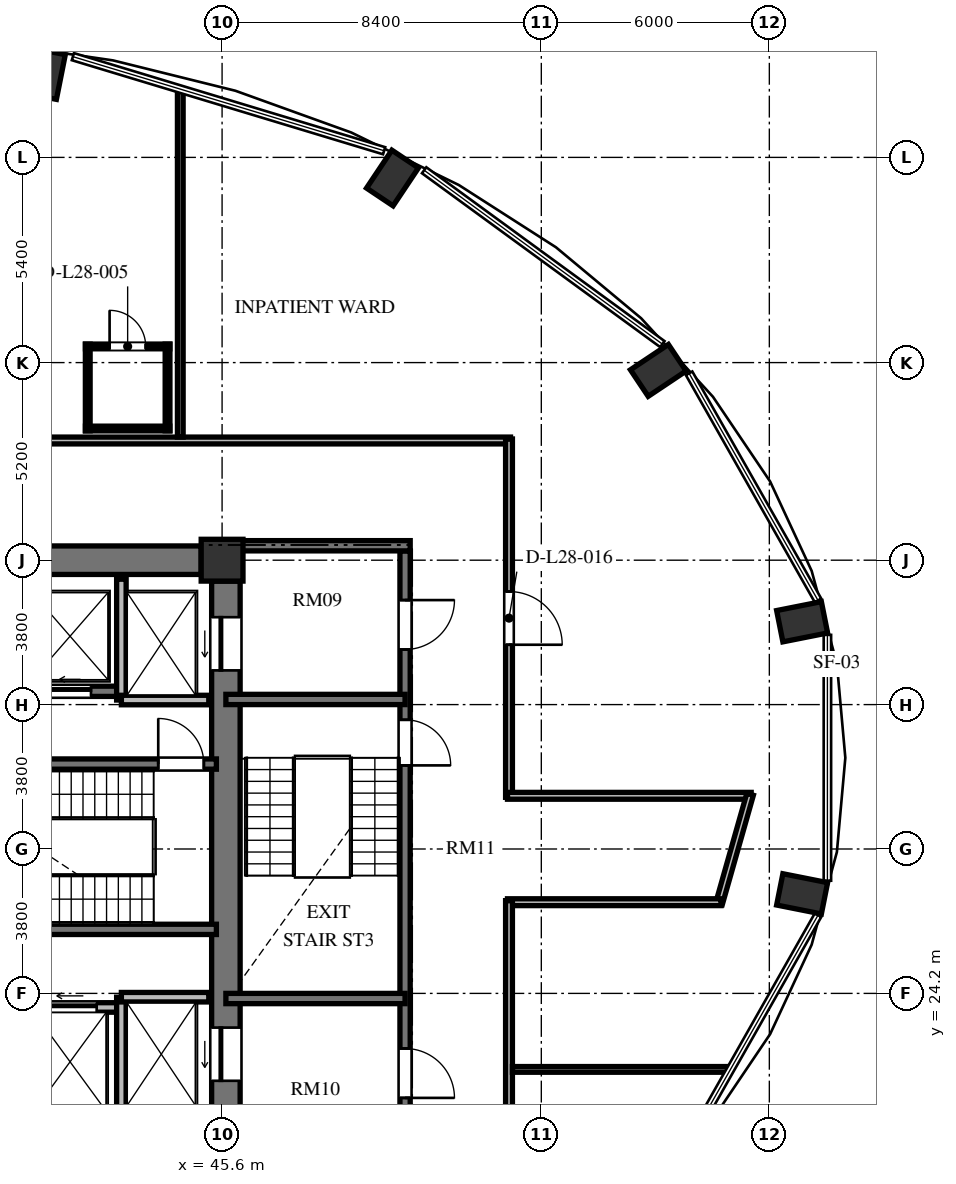
"""IFC4 building model, lengths in metres.
Left out: names, types, materials, properties, quantities, classifications, styles, units other than length and angle.
Written with IfcOpenShell. Run it as: python <this file> out.ifc"""

import sys

from ifc_helpers import new_model, si_unit, direction, frame, frame_2d, origin, origin_2d, place, context, subcontext, project, spatial, rectangle, extrude, element, fill, save


model = new_model("IFC4")
c1 = context("Model", 3, precision=1e-05, world=origin(), true_north=direction((0.0, 1.0)))
c2 = subcontext(c1, "Body", "Model", "MODEL_VIEW")
j1 = project(units=[si_unit("LENGTHUNIT", "METRE"), si_unit("PLANEANGLEUNIT", "RADIAN")], contexts=[c1])
p1 = place(None, origin())
s1 = spatial("IfcSite", under=j1, at=p1, CompositionType="ELEMENT")
p2 = place(p1, origin())
s2 = spatial("IfcBuilding", under=s1, at=p2, CompositionType="ELEMENT")
p3 = place(p2, frame((0.0, 0.0, 110.928)))
s3 = spatial("IfcBuildingStorey", under=s2, at=p3, CompositionType="ELEMENT", Elevation=110.928)
for number, where, z_axis, x_axis in (
    (1, (60.863, 26.82, 0.0), (0.0, 0.0, 1.0), (0.981, -0.195, 0.0)),
    (2, (60.863, 33.98, 0.0), (0.0, 0.0, 1.0), (0.981, 0.195, 0.0)),
    (3, (57.078, 40.595, 0.0), (0.0, 0.0, 1.0), (0.831, 0.556, 0.0)),
    (4, (50.084, 45.657, 0.0), (0.0, 0.0, 1.0), (0.556, 0.831, 0.0)),
    (5, (40.946, 48.397, 0.0), (0.0, 0.0, 1.0), (0.195, 0.981, 0.0)),
):
    element("IfcColumn", number, at=place(p3, frame(where, z_axis=z_axis, x_axis=x_axis)), inside=s3, PredefinedType="COLUMN", context=c2, shape_type="SweptSolid", body=[
        extrude(rectangle(XDim=1.2, YDim=0.84, at=origin_2d()), origin(), (0.0, 0.0, 1.0), 3.648),
    ])
p4 = place(p3, frame((45.6, 35.6, 0.0), z_axis=(0.0, 0.0, 1.0), x_axis=(1.0, 0.0, 0.0)))
e6 = element("IfcColumn", 6, at=p4, inside=s3, PredefinedType="COLUMN", context=c2, shape_type="SweptSolid", body=[
    extrude(rectangle(XDim=1.1, YDim=1.1, at=origin_2d()), origin(), (0.0, 0.0, 1.0), 3.648),
])
p5 = place(p3, frame((45.7, 20.95, 0.0), z_axis=(0.0, 0.0, 1.0), x_axis=(0.0, 1.0, 0.0)))
e7 = element("IfcWall", 7, at=p5, inside=s3, PredefinedType="SHEAR", context=c2, shape_type="SweptSolid", body=[
    extrude(rectangle(XDim=14.1, YDim=0.75, at=frame_2d((7.05, 0.0))), origin(), (0.0, 0.0, 1.0), 3.648),
])
p6 = place(p5, frame((11.75, 0.0, 0.0)))
e8 = element("IfcOpeningElement", 8, at=p6, cuts=e7, PredefinedType="OPENING", context=c2, shape_type="SweptSolid", body=[
    extrude(rectangle(XDim=1.4, YDim=2.3, at=frame_2d((0.7, 1.15))), frame((0.0, 0.385, 0.0), z_axis=(0.0, -1.0, 0.0), x_axis=(1.0, 0.0, 0.0)), (0.0, 0.0, 1.0), 0.77),
])
p7 = place(p5, frame((0.95, 0.0, 0.0)))
e9 = element("IfcOpeningElement", 9, at=p7, cuts=e7, PredefinedType="OPENING", context=c2, shape_type="SweptSolid", body=[
    extrude(rectangle(XDim=1.4, YDim=2.3, at=frame_2d((0.7, 1.15))), frame((0.0, 0.385, 0.0), z_axis=(0.0, -1.0, 0.0), x_axis=(1.0, 0.0, 0.0)), (0.0, 0.0, 1.0), 0.77),
])
p8 = place(p3, frame((39.675, 35.6, 0.0), z_axis=(0.0, 0.0, 1.0), x_axis=(1.0, 0.0, 0.0)))
e10 = element("IfcWall", 10, at=p8, inside=s3, PredefinedType="SHEAR", context=c2, shape_type="SweptSolid", body=[
    extrude(rectangle(XDim=5.375, YDim=0.75, at=frame_2d((2.688, 0.0))), origin(), (0.0, 0.0, 1.0), 3.648),
])
p9 = place(p3, frame((37.465, 30.235, 0.0), z_axis=(0.0, 0.0, 1.0), x_axis=(1.0, 0.0, 0.0)))
e11 = element("IfcWall", 11, at=p9, inside=s3, PredefinedType="SHEAR", context=c2, shape_type="SweptSolid", body=[
    extrude(rectangle(XDim=7.985, YDim=0.27, at=frame_2d((3.992, 0.0))), origin(), (0.0, 0.0, 1.0), 3.648),
])
p10 = place(p9, frame((6.455, 0.0, 0.0)))
e12 = element("IfcOpeningElement", 12, at=p10, cuts=e11, PredefinedType="OPENING", context=c2, shape_type="SweptSolid", body=[
    extrude(rectangle(XDim=1.2, YDim=2.15, at=frame_2d((0.6, 1.075))), frame((0.0, 0.145, 0.0), z_axis=(0.0, -1.0, 0.0), x_axis=(1.0, 0.0, 0.0)), (0.0, 0.0, 1.0), 0.29),
])
p11 = place(p3, frame((37.465, 25.885, 0.0), z_axis=(0.0, 0.0, 1.0), x_axis=(1.0, 0.0, 0.0)))
e13 = element("IfcWall", 13, at=p11, inside=s3, PredefinedType="SHEAR", context=c2, shape_type="SweptSolid", body=[
    extrude(rectangle(XDim=7.985, YDim=0.27, at=frame_2d((3.992, 0.0))), origin(), (0.0, 0.0, 1.0), 3.648),
])
p12 = place(p3, frame((26.55, 32.15, 0.0), z_axis=(0.0, 0.0, 1.0), x_axis=(1.0, 0.0, 0.0)))
e14 = element("IfcWall", 14, at=p12, inside=s3, PredefinedType="SHEAR", context=c2, shape_type="SweptSolid", body=[
    extrude(rectangle(XDim=16.4, YDim=0.27, at=frame_2d((8.2, 0.0))), origin(), (0.0, 0.0, 1.0), 3.648),
])
p13 = place(p12, frame((1.1, 0.0, 0.0)))
e15 = element("IfcOpeningElement", 15, at=p13, cuts=e14, PredefinedType="OPENING", context=c2, shape_type="SweptSolid", body=[
    extrude(rectangle(XDim=1.1, YDim=2.2, at=frame_2d((0.55, 1.1))), frame((0.0, 0.145, 0.0), z_axis=(0.0, -1.0, 0.0), x_axis=(1.0, 0.0, 0.0)), (0.0, 0.0, 1.0), 0.29),
])
p14 = place(p12, frame((3.7, 0.0, 0.0)))
e16 = element("IfcOpeningElement", 16, at=p14, cuts=e14, PredefinedType="OPENING", context=c2, shape_type="SweptSolid", body=[
    extrude(rectangle(XDim=1.1, YDim=2.2, at=frame_2d((0.55, 1.1))), frame((0.0, 0.145, 0.0), z_axis=(0.0, -1.0, 0.0), x_axis=(1.0, 0.0, 0.0)), (0.0, 0.0, 1.0), 0.29),
])
p15 = place(p12, frame((6.5, 0.0, 0.0)))
e17 = element("IfcOpeningElement", 17, at=p15, cuts=e14, PredefinedType="OPENING", context=c2, shape_type="SweptSolid", body=[
    extrude(rectangle(XDim=1.1, YDim=2.2, at=frame_2d((0.55, 1.1))), frame((0.0, 0.145, 0.0), z_axis=(0.0, -1.0, 0.0), x_axis=(1.0, 0.0, 0.0)), (0.0, 0.0, 1.0), 0.29),
])
p16 = place(p12, frame((9.1, 0.0, 0.0)))
e18 = element("IfcOpeningElement", 18, at=p16, cuts=e14, PredefinedType="OPENING", context=c2, shape_type="SweptSolid", body=[
    extrude(rectangle(XDim=1.1, YDim=2.2, at=frame_2d((0.55, 1.1))), frame((0.0, 0.145, 0.0), z_axis=(0.0, -1.0, 0.0), x_axis=(1.0, 0.0, 0.0)), (0.0, 0.0, 1.0), 0.29),
])
p17 = place(p12, frame((11.9, 0.0, 0.0)))
e19 = element("IfcOpeningElement", 19, at=p17, cuts=e14, PredefinedType="OPENING", context=c2, shape_type="SweptSolid", body=[
    extrude(rectangle(XDim=1.1, YDim=2.2, at=frame_2d((0.55, 1.1))), frame((0.0, 0.145, 0.0), z_axis=(0.0, -1.0, 0.0), x_axis=(1.0, 0.0, 0.0)), (0.0, 0.0, 1.0), 0.29),
])
p18 = place(p12, frame((14.5, 0.0, 0.0)))
e20 = element("IfcOpeningElement", 20, at=p18, cuts=e14, PredefinedType="OPENING", context=c2, shape_type="SweptSolid", body=[
    extrude(rectangle(XDim=1.1, YDim=2.2, at=frame_2d((0.55, 1.1))), frame((0.0, 0.145, 0.0), z_axis=(0.0, -1.0, 0.0), x_axis=(1.0, 0.0, 0.0)), (0.0, 0.0, 1.0), 0.29),
])
p19 = place(p3, frame((26.75, 23.83, 0.0), z_axis=(0.0, 0.0, 1.0), x_axis=(1.0, 0.0, 0.0)))
e21 = element("IfcWall", 21, at=p19, inside=s3, PredefinedType="SOLIDWALL", context=c2, shape_type="SweptSolid", body=[
    extrude(rectangle(XDim=16.2, YDim=0.25, at=frame_2d((8.1, 0.0))), origin(), (0.0, 0.0, 1.0), 3.428),
])
p20 = place(p19, frame((0.9, 0.0, 0.0)))
e22 = element("IfcOpeningElement", 22, at=p20, cuts=e21, PredefinedType="OPENING", context=c2, shape_type="SweptSolid", body=[
    extrude(rectangle(XDim=1.1, YDim=2.2, at=frame_2d((0.55, 1.1))), frame((0.0, 0.135, 0.0), z_axis=(0.0, -1.0, 0.0), x_axis=(1.0, 0.0, 0.0)), (0.0, 0.0, 1.0), 0.27),
])
p21 = place(p19, frame((3.5, 0.0, 0.0)))
e23 = element("IfcOpeningElement", 23, at=p21, cuts=e21, PredefinedType="OPENING", context=c2, shape_type="SweptSolid", body=[
    extrude(rectangle(XDim=1.1, YDim=2.2, at=frame_2d((0.55, 1.1))), frame((0.0, 0.135, 0.0), z_axis=(0.0, -1.0, 0.0), x_axis=(1.0, 0.0, 0.0)), (0.0, 0.0, 1.0), 0.27),
])
p22 = place(p19, frame((6.3, 0.0, 0.0)))
e24 = element("IfcOpeningElement", 24, at=p22, cuts=e21, PredefinedType="OPENING", context=c2, shape_type="SweptSolid", body=[
    extrude(rectangle(XDim=1.1, YDim=2.2, at=frame_2d((0.55, 1.1))), frame((0.0, 0.135, 0.0), z_axis=(0.0, -1.0, 0.0), x_axis=(1.0, 0.0, 0.0)), (0.0, 0.0, 1.0), 0.27),
])
p23 = place(p19, frame((8.9, 0.0, 0.0)))
e25 = element("IfcOpeningElement", 25, at=p23, cuts=e21, PredefinedType="OPENING", context=c2, shape_type="SweptSolid", body=[
    extrude(rectangle(XDim=1.1, YDim=2.2, at=frame_2d((0.55, 1.1))), frame((0.0, 0.135, 0.0), z_axis=(0.0, -1.0, 0.0), x_axis=(1.0, 0.0, 0.0)), (0.0, 0.0, 1.0), 0.27),
])
p24 = place(p19, frame((11.7, 0.0, 0.0)))
e26 = element("IfcOpeningElement", 26, at=p24, cuts=e21, PredefinedType="OPENING", context=c2, shape_type="SweptSolid", body=[
    extrude(rectangle(XDim=1.1, YDim=2.2, at=frame_2d((0.55, 1.1))), frame((0.0, 0.135, 0.0), z_axis=(0.0, -1.0, 0.0), x_axis=(1.0, 0.0, 0.0)), (0.0, 0.0, 1.0), 0.27),
])
p25 = place(p19, frame((14.15, 0.0, 0.0)))
e27 = element("IfcOpeningElement", 27, at=p25, cuts=e21, PredefinedType="OPENING", context=c2, shape_type="SweptSolid", body=[
    extrude(rectangle(XDim=1.4, YDim=2.3, at=frame_2d((0.7, 1.15))), frame((0.0, 0.135, 0.0), z_axis=(0.0, -1.0, 0.0), x_axis=(1.0, 0.0, 0.0)), (0.0, 0.0, 1.0), 0.27),
])
p26 = place(p3, frame((42.95, 31.92, 0.0), z_axis=(0.0, 0.0, 1.0), x_axis=(0.0, 1.0, 0.0)))
e28 = element("IfcWall", 28, at=p26, inside=s3, PredefinedType="SOLIDWALL", context=c2, shape_type="SweptSolid", body=[
    extrude(rectangle(XDim=3.18, YDim=0.25, at=frame_2d((1.59, 0.0))), origin(), (0.0, 0.0, 1.0), 3.428),
])
p27 = place(p3, frame((42.95, 31.92, 0.0), z_axis=(0.0, 0.0, 1.0), x_axis=(1.0, 0.0, 0.0)))
e29 = element("IfcWall", 29, at=p27, inside=s3, PredefinedType="SOLIDWALL", context=c2, shape_type="SweptSolid", body=[
    extrude(rectangle(XDim=2.3, YDim=0.25, at=frame_2d((1.15, 0.0))), origin(), (0.0, 0.0, 1.0), 3.428),
])
p28 = place(p3, frame((42.95, 20.9, 0.0), z_axis=(0.0, 0.0, 1.0), x_axis=(0.0, 1.0, 0.0)))
e30 = element("IfcWall", 30, at=p28, inside=s3, PredefinedType="SOLIDWALL", context=c2, shape_type="SweptSolid", body=[
    extrude(rectangle(XDim=3.2, YDim=0.25, at=frame_2d((1.6, 0.0))), origin(), (0.0, 0.0, 1.0), 3.428),
])
p29 = place(p3, frame((42.95, 24.1, 0.0), z_axis=(0.0, 0.0, 1.0), x_axis=(1.0, 0.0, 0.0)))
e31 = element("IfcWall", 31, at=p29, inside=s3, PredefinedType="SOLIDWALL", context=c2, shape_type="SweptSolid", body=[
    extrude(rectangle(XDim=2.3, YDim=0.25, at=frame_2d((1.15, 0.0))), origin(), (0.0, 0.0, 1.0), 3.428),
])
p30 = place(p3, frame((50.415, 35.845, 0.0), z_axis=(0.0, 0.0, 1.0), x_axis=(0.0, -1.0, 0.0)))
e32 = element("IfcWall", 32, at=p30, inside=s3, PredefinedType="SHEAR", context=c2, shape_type="SweptSolid", body=[
    extrude(rectangle(XDim=15.825, YDim=0.27, at=frame_2d((7.913, 0.0))), origin(), (0.0, 0.0, 1.0), 3.648),
])
p31 = place(p30, frame((4.445, 0.0, 0.0)))
e33 = element("IfcOpeningElement", 33, at=p31, cuts=e32, PredefinedType="OPENING", context=c2, shape_type="SweptSolid", body=[
    extrude(rectangle(XDim=1.2, YDim=2.15, at=frame_2d((0.6, 1.075))), frame((0.0, 0.145, 0.0), z_axis=(0.0, -1.0, 0.0), x_axis=(1.0, 0.0, 0.0)), (0.0, 0.0, 1.0), 0.29),
])
p32 = place(p30, frame((1.295, 0.0, 0.0)))
e34 = element("IfcOpeningElement", 34, at=p32, cuts=e32, PredefinedType="OPENING", context=c2, shape_type="SweptSolid", body=[
    extrude(rectangle(XDim=1.3, YDim=2.2, at=frame_2d((0.65, 1.1))), frame((0.0, 0.145, 0.0), z_axis=(0.0, -1.0, 0.0), x_axis=(1.0, 0.0, 0.0)), (0.0, 0.0, 1.0), 0.29),
])
p33 = place(p30, frame((13.095, 0.0, 0.0)))
e35 = element("IfcOpeningElement", 35, at=p33, cuts=e32, PredefinedType="OPENING", context=c2, shape_type="SweptSolid", body=[
    extrude(rectangle(XDim=1.3, YDim=2.2, at=frame_2d((0.65, 1.1))), frame((0.0, 0.145, 0.0), z_axis=(0.0, -1.0, 0.0), x_axis=(1.0, 0.0, 0.0)), (0.0, 0.0, 1.0), 0.29),
])
p34 = place(p3, frame((46.075, 35.98, 0.0), z_axis=(0.0, 0.0, 1.0), x_axis=(1.0, 0.0, 0.0)))
e36 = element("IfcWall", 36, at=p34, inside=s3, PredefinedType="SHEAR", context=c2, shape_type="SweptSolid", body=[
    extrude(rectangle(XDim=4.475, YDim=0.27, at=frame_2d((2.238, 0.0))), origin(), (0.0, 0.0, 1.0), 3.648),
])
for number, where, z_axis, x_axis in (
    (37, (45.7, 31.935, 0.0), (0.0, 0.0, 1.0), (1.0, 0.0, 0.0)),
    (38, (45.7, 24.065, 0.0), (0.0, 0.0, 1.0), (1.0, 0.0, 0.0)),
):
    element("IfcWall", number, at=place(p3, frame(where, z_axis=z_axis, x_axis=x_axis)), inside=s3, PredefinedType="SHEAR", context=c2, shape_type="SweptSolid", body=[
        extrude(rectangle(XDim=4.715, YDim=0.27, at=frame_2d((2.357, 0.0))), origin(), (0.0, 0.0, 1.0), 3.648),
    ])
p35 = place(p3, frame((23.287, 38.75, 0.0), z_axis=(0.0, 0.0, 1.0), x_axis=(1.0, 0.0, 0.0)))
e39 = element("IfcWall", 39, at=p35, inside=s3, PredefinedType="PARTITIONING", context=c2, shape_type="SweptSolid", body=[
    extrude(rectangle(XDim=29.903, YDim=0.18, at=frame_2d((14.952, 0.0))), origin(), (0.0, 0.0, 1.0), 3.053),
])
p36 = place(p35, frame((12.615, 0.0, 0.0)))
e40 = element("IfcOpeningElement", 40, at=p36, cuts=e39, PredefinedType="OPENING", context=c2, shape_type="SweptSolid", body=[
    extrude(rectangle(XDim=1.4, YDim=2.2, at=frame_2d((0.7, 1.1))), frame((0.0, 0.1, 0.0), z_axis=(0.0, -1.0, 0.0), x_axis=(1.0, 0.0, 0.0)), (0.0, 0.0, 1.0), 0.2),
])
p37 = place(p35, frame((3.567, 0.0, 0.0)))
e41 = element("IfcOpeningElement", 41, at=p37, cuts=e39, PredefinedType="OPENING", context=c2, shape_type="SweptSolid", body=[
    extrude(rectangle(XDim=1.4, YDim=2.2, at=frame_2d((0.7, 1.1))), frame((0.0, 0.1, 0.0), z_axis=(0.0, -1.0, 0.0), x_axis=(1.0, 0.0, 0.0)), (0.0, 0.0, 1.0), 0.2),
])
p38 = place(p3, frame((53.15, 38.79, 0.0), z_axis=(0.0, 0.0, 1.0), x_axis=(0.0, -1.0, 0.0)))
e42 = element("IfcWall", 42, at=p38, inside=s3, PredefinedType="PARTITIONING", context=c2, shape_type="SweptSolid", body=[
    extrude(rectangle(XDim=9.43, YDim=0.18, at=frame_2d((4.715, 0.0))), origin(), (0.0, 0.0, 1.0), 3.428),
])
p39 = place(p38, frame((4.015, 0.0, 0.0)))
e43 = element("IfcOpeningElement", 43, at=p39, cuts=e42, PredefinedType="OPENING", context=c2, shape_type="SweptSolid", body=[
    extrude(rectangle(XDim=1.4, YDim=2.2, at=frame_2d((0.7, 1.1))), frame((0.0, 0.1, 0.0), z_axis=(0.0, -1.0, 0.0), x_axis=(1.0, 0.0, 0.0)), (0.0, 0.0, 1.0), 0.2),
])
p40 = place(p3, frame((53.11, 29.4, 0.0), z_axis=(0.0, 0.0, 1.0), x_axis=(1.0, 0.0, 0.0)))
e44 = element("IfcWall", 44, at=p40, inside=s3, PredefinedType="PARTITIONING", context=c2, shape_type="SweptSolid", body=[
    extrude(rectangle(XDim=6.413, YDim=0.18, at=frame_2d((3.206, 0.0))), origin(), (0.0, 0.0, 1.0), 3.428),
])
p41 = place(p3, frame((59.494, 29.438, 0.0), z_axis=(0.0, 0.0, 1.0), x_axis=(-0.273222154729, -0.961950962453, 0.0)))
e45 = element("IfcWall", 45, at=p41, inside=s3, PredefinedType="PARTITIONING", context=c2, shape_type="SweptSolid", body=[
    extrude(rectangle(XDim=2.991, YDim=0.18, at=frame_2d((1.495, 0.0))), origin(), (0.0, 0.0, 1.0), 3.428),
])
p42 = place(p3, frame((58.727, 26.6, 0.0), z_axis=(0.0, 0.0, 1.0), x_axis=(-1.0, 0.0, 0.0)))
e46 = element("IfcWall", 46, at=p42, inside=s3, PredefinedType="PARTITIONING", context=c2, shape_type="SweptSolid", body=[
    extrude(rectangle(XDim=5.617, YDim=0.18, at=frame_2d((2.809, 0.0))), origin(), (0.0, 0.0, 1.0), 3.428),
])
p43 = place(p3, frame((53.15, 26.64, 0.0), z_axis=(0.0, 0.0, 1.0), x_axis=(0.0, -1.0, 0.0)))
e47 = element("IfcWall", 47, at=p43, inside=s3, PredefinedType="PARTITIONING", context=c2, shape_type="SweptSolid", body=[
    extrude(rectangle(XDim=6.66, YDim=0.18, at=frame_2d((3.33, 0.0))), origin(), (0.0, 0.0, 1.0), 3.428),
])
p44 = place(p3, frame((53.24, 22.2, 0.0), z_axis=(0.0, 0.0, 1.0), x_axis=(1.0, 0.0, 0.0)))
e48 = element("IfcWall", 48, at=p44, inside=s3, PredefinedType="PARTITIONING", context=c2, shape_type="SweptSolid", body=[
    extrude(rectangle(XDim=5.731, YDim=0.15, at=frame_2d((2.866, 0.0))), origin(), (0.0, 0.0, 1.0), 3.428),
])
p45 = place(p3, frame((44.5, 38.84, 0.0), z_axis=(0.0, 0.0, 1.0), x_axis=(0.0, 1.0, 0.0)))
e49 = element("IfcWall", 49, at=p45, inside=s3, PredefinedType="PARTITIONING", context=c2, shape_type="SweptSolid", body=[
    extrude(rectangle(XDim=9.143, YDim=0.15, at=frame_2d((4.571, 0.0))), origin(), (0.0, 0.0, 1.0), 3.428),
])
p46 = place(p3, frame((42.005, 41.225, 0.0), z_axis=(0.0, 0.0, 1.0), x_axis=(1.0, 0.0, 0.0)))
e50 = element("IfcWall", 50, at=p46, inside=s3, PredefinedType="PARTITIONING", context=c2, shape_type="SweptSolid", body=[
    extrude(rectangle(XDim=2.22, YDim=0.125, at=frame_2d((1.11, 0.0))), origin(), (0.0, 0.0, 1.0), 3.428),
])
p47 = place(p46, frame((0.635, 0.0, 0.0)))
e51 = element("IfcOpeningElement", 51, at=p47, cuts=e50, PredefinedType="OPENING", context=c2, shape_type="SweptSolid", body=[
    extrude(rectangle(XDim=0.95, YDim=2.1, at=frame_2d((0.475, 1.05))), frame((0.0, 0.073, 0.0), z_axis=(0.0, -1.0, 0.0), x_axis=(1.0, 0.0, 0.0)), (0.0, 0.0, 1.0), 0.145),
])
p48 = place(p3, frame((42.005, 39.065, 0.0), z_axis=(0.0, 0.0, 1.0), x_axis=(1.0, 0.0, 0.0)))
e52 = element("IfcWall", 52, at=p48, inside=s3, PredefinedType="PARTITIONING", context=c2, shape_type="SweptSolid", body=[
    extrude(rectangle(XDim=2.22, YDim=0.125, at=frame_2d((1.11, 0.0))), origin(), (0.0, 0.0, 1.0), 3.428),
])
for number, where, z_axis, x_axis in (
    (53, (44.165, 39.005, 0.0), (0.0, 0.0, 1.0), (0.0, 1.0, 0.0)),
    (54, (42.065, 39.005, 0.0), (0.0, 0.0, 1.0), (0.0, 1.0, 0.0)),
):
    element("IfcWall", number, at=place(p3, frame(where, z_axis=z_axis, x_axis=x_axis)), inside=s3, PredefinedType="PARTITIONING", context=c2, shape_type="SweptSolid", body=[
        extrude(rectangle(XDim=2.28, YDim=0.125, at=frame_2d((1.14, 0.0))), origin(), (0.0, 0.0, 1.0), 3.428),
    ])
p49 = place(p10, origin())
e55 = element("IfcDoor", 55, at=p49, inside=s3, OperationType="SINGLE_SWING_LEFT", PredefinedType="DOOR", context=c2, shape_type="SweptSolid", body=[
    extrude(rectangle(XDim=1.2, YDim=2.15, at=frame_2d((0.6, 1.075))), frame((0.0, 0.025, 0.0), z_axis=(0.0, -1.0, 0.0), x_axis=(1.0, 0.0, 0.0)), (0.0, 0.0, 1.0), 0.05),
])
fill(e12, e55)
p50 = place(p18, origin())
e56 = element("IfcDoor", 56, at=p50, inside=s3, OperationType="SLIDING_TO_LEFT", PredefinedType="DOOR", context=c2, shape_type="SweptSolid", body=[
    extrude(rectangle(XDim=1.1, YDim=2.2, at=frame_2d((0.55, 1.1))), frame((0.0, 0.025, 0.0), z_axis=(0.0, -1.0, 0.0), x_axis=(1.0, 0.0, 0.0)), (0.0, 0.0, 1.0), 0.05),
])
fill(e20, e56)
p51 = place(p6, origin())
e57 = element("IfcDoor", 57, at=p51, inside=s3, OperationType="SLIDING_TO_LEFT", PredefinedType="DOOR", context=c2, shape_type="SweptSolid", body=[
    extrude(rectangle(XDim=1.4, YDim=2.3, at=frame_2d((0.7, 1.15))), frame((0.0, 0.025, 0.0), z_axis=(0.0, -1.0, 0.0), x_axis=(1.0, 0.0, 0.0)), (0.0, 0.0, 1.0), 0.05),
])
fill(e8, e57)
p52 = place(p7, origin())
e58 = element("IfcDoor", 58, at=p52, inside=s3, OperationType="SLIDING_TO_LEFT", PredefinedType="DOOR", context=c2, shape_type="SweptSolid", body=[
    extrude(rectangle(XDim=1.4, YDim=2.3, at=frame_2d((0.7, 1.15))), frame((0.0, 0.025, 0.0), z_axis=(0.0, -1.0, 0.0), x_axis=(1.0, 0.0, 0.0)), (0.0, 0.0, 1.0), 0.05),
])
fill(e9, e58)
p53 = place(p25, origin())
e59 = element("IfcDoor", 59, at=p53, inside=s3, OperationType="SLIDING_TO_LEFT", PredefinedType="DOOR", context=c2, shape_type="SweptSolid", body=[
    extrude(rectangle(XDim=1.4, YDim=2.3, at=frame_2d((0.7, 1.15))), frame((0.0, 0.025, 0.0), z_axis=(0.0, -1.0, 0.0), x_axis=(1.0, 0.0, 0.0)), (0.0, 0.0, 1.0), 0.05),
])
fill(e27, e59)
p54 = place(p31, origin())
e60 = element("IfcDoor", 60, at=p54, inside=s3, OperationType="SINGLE_SWING_RIGHT", PredefinedType="DOOR", context=c2, shape_type="SweptSolid", body=[
    extrude(rectangle(XDim=1.2, YDim=2.15, at=frame_2d((0.6, 1.075))), frame((0.0, 0.025, 0.0), z_axis=(0.0, -1.0, 0.0), x_axis=(1.0, 0.0, 0.0)), (0.0, 0.0, 1.0), 0.05),
])
fill(e33, e60)
p55 = place(p32, origin())
e61 = element("IfcDoor", 61, at=p55, inside=s3, OperationType="SINGLE_SWING_LEFT", PredefinedType="DOOR", context=c2, shape_type="SweptSolid", body=[
    extrude(rectangle(XDim=1.3, YDim=2.2, at=frame_2d((0.65, 1.1))), frame((0.0, 0.025, 0.0), z_axis=(0.0, -1.0, 0.0), x_axis=(1.0, 0.0, 0.0)), (0.0, 0.0, 1.0), 0.05),
])
fill(e34, e61)
p56 = place(p33, origin())
e62 = element("IfcDoor", 62, at=p56, inside=s3, OperationType="SINGLE_SWING_RIGHT", PredefinedType="DOOR", context=c2, shape_type="SweptSolid", body=[
    extrude(rectangle(XDim=1.3, YDim=2.2, at=frame_2d((0.65, 1.1))), frame((0.0, 0.025, 0.0), z_axis=(0.0, -1.0, 0.0), x_axis=(1.0, 0.0, 0.0)), (0.0, 0.0, 1.0), 0.05),
])
fill(e35, e62)
p57 = place(p39, origin())
e63 = element("IfcDoor", 63, at=p57, inside=s3, OperationType="SINGLE_SWING_RIGHT", PredefinedType="DOOR", context=c2, shape_type="SweptSolid", body=[
    extrude(rectangle(XDim=1.4, YDim=2.2, at=frame_2d((0.7, 1.1))), frame((0.0, 0.025, 0.0), z_axis=(0.0, -1.0, 0.0), x_axis=(1.0, 0.0, 0.0)), (0.0, 0.0, 1.0), 0.05),
])
fill(e43, e63)
p58 = place(p47, origin())
e64 = element("IfcDoor", 64, at=p58, inside=s3, OperationType="SINGLE_SWING_LEFT", PredefinedType="DOOR", context=c2, shape_type="SweptSolid", body=[
    extrude(rectangle(XDim=0.95, YDim=2.1, at=frame_2d((0.475, 1.05))), frame((0.0, 0.025, 0.0), z_axis=(0.0, -1.0, 0.0), x_axis=(1.0, 0.0, 0.0)), (0.0, 0.0, 1.0), 0.05),
])
fill(e51, e64)
save(model, sys.argv[1])
